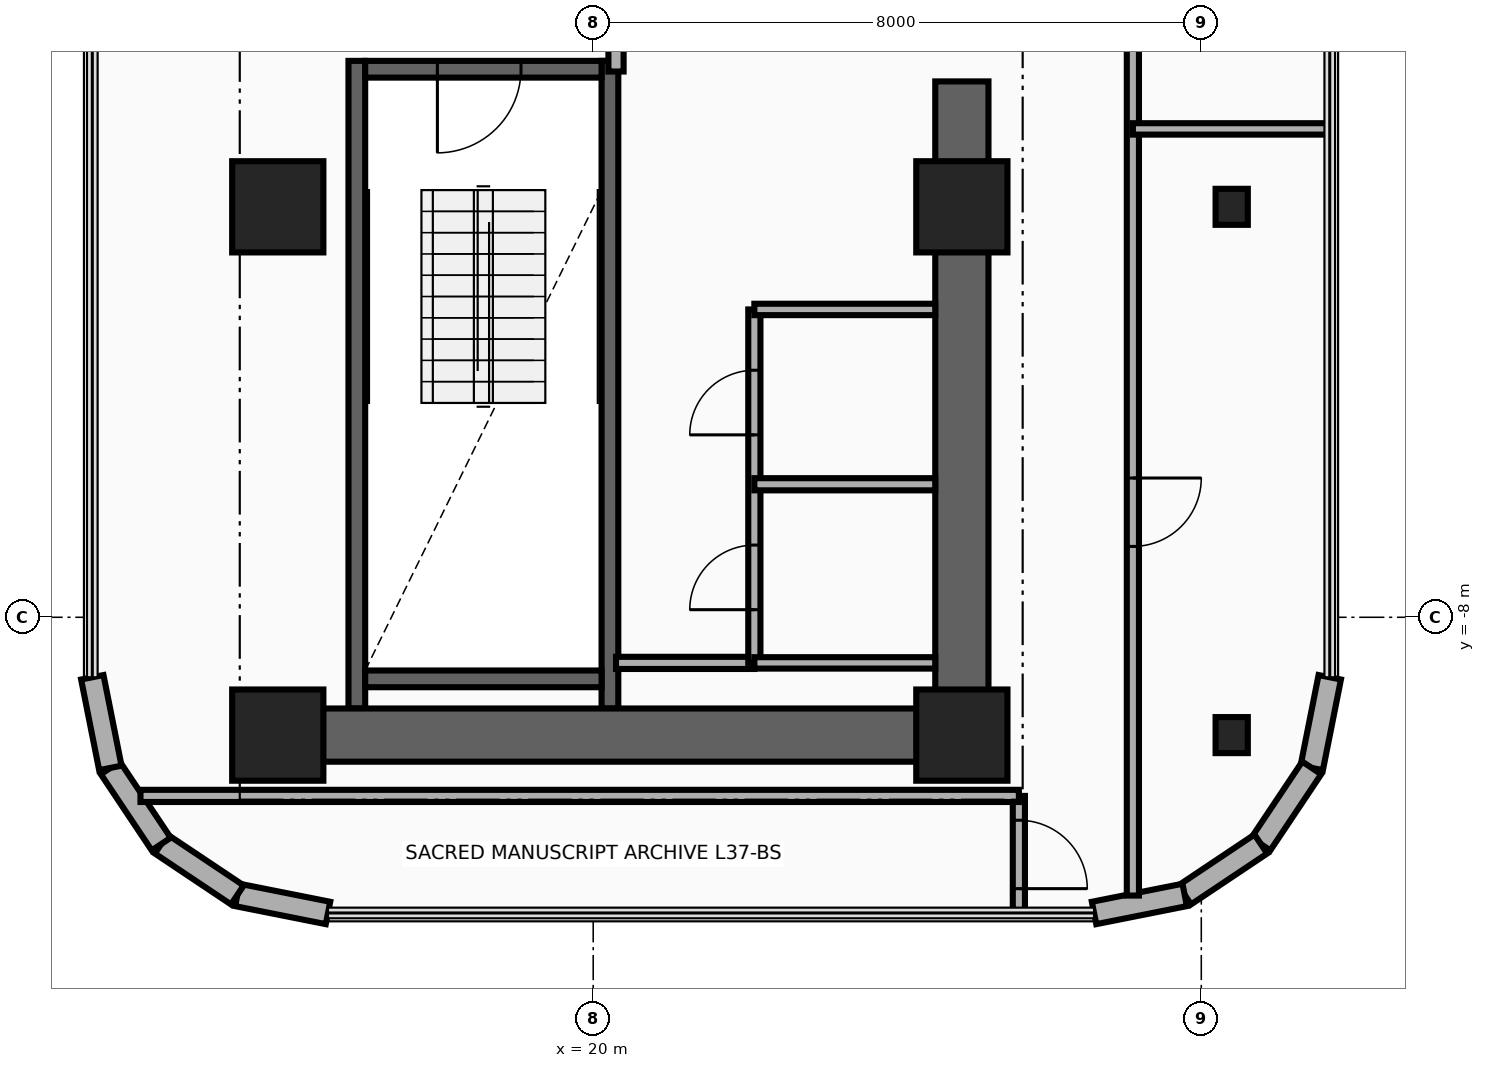
"""IFC4 building model, lengths in metres.
Left out: names, types, materials, properties, quantities, classifications, styles, units other than length and angle.
Written with IfcOpenShell. Run it as: python <this file> out.ifc"""

import sys

from ifc_helpers import new_model, si_unit, direction, frame, frame_2d, origin, origin_2d, place, context, subcontext, project, spatial, rectangle, i_section, extrude, source, transform, mapped, element, fill, save


model = new_model("IFC4")
c1 = context("Model", 3, precision=1e-05, world=origin(), true_north=direction((0.0, 1.0)))
c2 = subcontext(c1, "Body", "Model", "MODEL_VIEW")
j1 = project(units=[si_unit("LENGTHUNIT", "METRE"), si_unit("PLANEANGLEUNIT", "RADIAN")], contexts=[c1])
p1 = place(None, origin())
s1 = spatial("IfcSite", under=j1, at=p1, CompositionType="ELEMENT")
p2 = place(p1, origin())
s2 = spatial("IfcBuilding", under=s1, at=p2, CompositionType="ELEMENT")
p3 = place(p2, frame((0.0, 0.0, 146.4)))
s3 = spatial("IfcBuildingStorey", under=s2, at=p3, CompositionType="ELEMENT", Elevation=146.4)
for number, where, z_axis, x_axis in (
    (1, (16.89, -9.2, 0.0), (0.0, 0.0, 1.0), (0.0, 1.0, 0.0)),
    (2, (20.22, -9.2, 0.0), (0.0, 0.0, 1.0), (0.0, 1.0, 0.0)),
):
    element("IfcWall", number, at=place(p3, frame(where, z_axis=z_axis, x_axis=x_axis)), inside=s3, PredefinedType="SHEAR", context=c2, shape_type="SweptSolid", body=[
        extrude(rectangle(XDim=8.52, YDim=0.22, at=frame_2d((4.26, 0.0))), origin(), (0.0, 0.0, 1.0), 3.46),
    ])
p4 = place(p3, frame((17.0, -8.81, 0.0), z_axis=(0.0, 0.0, 1.0), x_axis=(1.0, 0.0, 0.0)))
e3 = element("IfcWall", 3, at=p4, inside=s3, PredefinedType="SHEAR", context=c2, shape_type="SweptSolid", body=[
    extrude(rectangle(XDim=3.11, YDim=0.22, at=frame_2d((1.555, 0.0))), origin(), (0.0, 0.0, 1.0), 3.46),
])
p5 = place(p3, frame((17.0, -0.79, 0.0), z_axis=(0.0, 0.0, 1.0), x_axis=(1.0, 0.0, 0.0)))
e4 = element("IfcWall", 4, at=p5, inside=s3, PredefinedType="SHEAR", context=c2, shape_type="SweptSolid", body=[
    extrude(rectangle(XDim=3.11, YDim=0.22, at=frame_2d((1.555, 0.0))), origin(), (0.0, 0.0, 1.0), 3.46),
])
p6 = place(p5, frame((0.95, 0.0, 0.0)))
e5 = element("IfcOpeningElement", 5, at=p6, cuts=e4, PredefinedType="OPENING", context=c2, shape_type="SweptSolid", body=[
    extrude(rectangle(XDim=1.1, YDim=2.15, at=frame_2d((0.55, 1.075))), frame((0.0, 0.125, 0.0), z_axis=(0.0, -1.0, 0.0), x_axis=(1.0, 0.0, 0.0)), (0.0, 0.0, 1.0), 0.25),
])
p7 = place(p3, frame((24.85, -9.9, 0.0), z_axis=(0.0, 0.0, 1.0), x_axis=(0.0, 1.0, 0.0)))
e6 = element("IfcWall", 6, at=p7, inside=s3, PredefinedType="SHEAR", context=c2, shape_type="SweptSolid", body=[
    extrude(rectangle(XDim=8.95, YDim=0.7, at=frame_2d((4.475, 0.0))), origin(), (0.0, 0.0, 1.0), 3.46),
])
p8 = place(p3, frame((15.85, -9.55, 0.0), z_axis=(0.0, 0.0, 1.0), x_axis=(1.0, 0.0, 0.0)))
e7 = element("IfcWall", 7, at=p8, inside=s3, PredefinedType="SHEAR", context=c2, shape_type="SweptSolid", body=[
    extrude(rectangle(XDim=9.0, YDim=0.7, at=frame_2d((4.5, 0.0))), origin(), (0.0, 0.0, 1.0), 3.46),
])
m1 = source(origin(), c2, "Body", "SweptSolid", [
    extrude(rectangle(XDim=1.2, YDim=1.2, at=origin_2d()), origin(), (0.0, 0.0, 1.0), 3.7),
])
for number, where, z_axis, x_axis in (
    (8, (15.85, -9.55, 0.0), (0.0, 0.0, 1.0), (1.0, 0.0, 0.0)),
    (9, (24.85, -9.55, 0.0), (0.0, 0.0, 1.0), (1.0, 0.0, 0.0)),
):
    element("IfcColumn", number, at=place(p3, frame(where, z_axis=z_axis, x_axis=x_axis)), inside=s3, PredefinedType="COLUMN", context=c2, shape_type="MappedRepresentation", body=[
        mapped(m1, transform((0.0, 0.0, 0.0), x_axis=(1.0, 0.0, 0.0), y_axis=(0.0, 1.0, 0.0), z_axis=(0.0, 0.0, 1.0), scale=1.0)),
    ])
m2 = source(origin(), c2, "Body", "SweptSolid", [
    extrude(i_section(OverallWidth=0.424, OverallDepth=0.474, WebThickness=0.048, FlangeThickness=0.077, at=origin_2d()), origin(), (0.0, 0.0, 1.0), 3.7),
])
p9 = place(p3, frame((28.4, -9.55, 0.0), z_axis=(0.0, 0.0, 1.0), x_axis=(1.0, 0.0, 0.0)))
e10 = element("IfcColumn", 10, at=p9, inside=s3, PredefinedType="COLUMN", context=c2, shape_type="MappedRepresentation", body=[
    mapped(m2, transform((0.0, 0.0, 0.0), x_axis=(1.0, 0.0, 0.0), y_axis=(0.0, 1.0, 0.0), z_axis=(0.0, 0.0, 1.0), scale=1.0)),
])
for number, where, z_axis, x_axis in (
    (11, (15.85, -2.6, 0.0), (0.0, 0.0, 1.0), (1.0, 0.0, 0.0)),
    (12, (24.85, -2.6, 0.0), (0.0, 0.0, 1.0), (1.0, 0.0, 0.0)),
):
    element("IfcColumn", number, at=place(p3, frame(where, z_axis=z_axis, x_axis=x_axis)), inside=s3, PredefinedType="COLUMN", context=c2, shape_type="MappedRepresentation", body=[
        mapped(m1, transform((0.0, 0.0, 0.0), x_axis=(1.0, 0.0, 0.0), y_axis=(0.0, 1.0, 0.0), z_axis=(0.0, 0.0, 1.0), scale=1.0)),
    ])
p10 = place(p3, frame((28.4, -2.6, 0.0), z_axis=(0.0, 0.0, 1.0), x_axis=(1.0, 0.0, 0.0)))
e13 = element("IfcColumn", 13, at=p10, inside=s3, PredefinedType="COLUMN", context=c2, shape_type="MappedRepresentation", body=[
    mapped(m2, transform((0.0, 0.0, 0.0), x_axis=(1.0, 0.0, 0.0), y_axis=(0.0, 1.0, 0.0), z_axis=(0.0, 0.0, 1.0), scale=1.0)),
])
p11 = place(p3, frame((29.69, -8.789, 0.0), z_axis=(0.0, 0.0, 1.0), x_axis=(-0.194996050505, -0.980804027463, 0.0)))
e14 = element("IfcWall", 14, at=p11, inside=s3, PredefinedType="SOLIDWALL", context=c2, shape_type="SweptSolid", body=[
    extrude(rectangle(XDim=1.216, YDim=0.3, at=frame_2d((0.608, 0.0))), origin(), (0.0, 0.0, 1.0), 3.46),
])
for number, where, z_axis, x_axis in (
    (15, (29.453, -9.982, 0.0), (0.0, 0.0, 1.0), (-0.556, -0.831, 0.0)),
    (16, (28.783, -10.983, 0.0), (0.0, 0.0, 1.0), (-0.831, -0.556, 0.0)),
):
    element("IfcWall", number, at=place(p3, frame(where, z_axis=z_axis, x_axis=x_axis)), inside=s3, PredefinedType="SOLIDWALL", context=c2, shape_type="SweptSolid", body=[
        extrude(rectangle(XDim=1.205, YDim=0.3, at=frame_2d((0.603, 0.0))), origin(), (0.0, 0.0, 1.0), 3.46),
    ])
p12 = place(p3, frame((27.782, -11.653, 0.0), z_axis=(0.0, 0.0, 1.0), x_axis=(-0.980811661072, -0.194957650543, 0.0)))
e17 = element("IfcWall", 17, at=p12, inside=s3, PredefinedType="SOLIDWALL", context=c2, shape_type="SweptSolid", body=[
    extrude(rectangle(XDim=1.216, YDim=0.3, at=frame_2d((0.608, 0.0))), origin(), (0.0, 0.0, 1.0), 3.46),
])
p13 = place(p3, frame((16.511, -11.89, 0.0), z_axis=(0.0, 0.0, 1.0), x_axis=(-0.980804027463, 0.194996050505, 0.0)))
e18 = element("IfcWall", 18, at=p13, inside=s3, PredefinedType="SOLIDWALL", context=c2, shape_type="SweptSolid", body=[
    extrude(rectangle(XDim=1.216, YDim=0.3, at=frame_2d((0.608, 0.0))), origin(), (0.0, 0.0, 1.0), 3.46),
])
for number, where, z_axis, x_axis in (
    (19, (15.318, -11.653, 0.0), (0.0, 0.0, 1.0), (-0.831, 0.556, 0.0)),
    (20, (14.317, -10.983, 0.0), (0.0, 0.0, 1.0), (-0.556, 0.831, 0.0)),
):
    element("IfcWall", number, at=place(p3, frame(where, z_axis=z_axis, x_axis=x_axis)), inside=s3, PredefinedType="SOLIDWALL", context=c2, shape_type="SweptSolid", body=[
        extrude(rectangle(XDim=1.205, YDim=0.3, at=frame_2d((0.603, 0.0))), origin(), (0.0, 0.0, 1.0), 3.46),
    ])
p14 = place(p3, frame((13.647, -9.982, 0.0), z_axis=(0.0, 0.0, 1.0), x_axis=(-0.195189223115, 0.980765602568, 0.0)))
e21 = element("IfcWall", 21, at=p14, inside=s3, PredefinedType="SOLIDWALL", context=c2, shape_type="SweptSolid", body=[
    extrude(rectangle(XDim=1.216, YDim=0.3, at=frame_2d((0.608, 0.0))), origin(), (0.0, 0.0, 1.0), 3.46),
])
p15 = place(p3, frame((20.3, -0.82, 0.0), z_axis=(0.0, 0.0, 1.0), x_axis=(0.0, 1.0, 0.0)))
e22 = element("IfcWall", 22, at=p15, inside=s3, PredefinedType="PARTITIONING", context=c2, shape_type="SweptSolid", body=[
    extrude(rectangle(XDim=1.64, YDim=0.2, at=frame_2d((0.82, 0.0))), origin(), (0.0, 0.0, 1.0), 3.46),
])
p16 = place(p15, frame((0.295, 0.0, 0.0)))
e23 = element("IfcOpeningElement", 23, at=p16, cuts=e22, PredefinedType="OPENING", context=c2, shape_type="SweptSolid", body=[
    extrude(rectangle(XDim=1.05, YDim=2.15, at=frame_2d((0.525, 1.075))), frame((0.0, 0.115, 0.0), z_axis=(0.0, -1.0, 0.0), x_axis=(1.0, 0.0, 0.0)), (0.0, 0.0, 1.0), 0.23),
])
p17 = place(p3, frame((20.3, -8.6, 0.0), z_axis=(0.0, 0.0, 1.0), x_axis=(1.0, 0.0, 0.0)))
e24 = element("IfcWall", 24, at=p17, inside=s3, PredefinedType="PARTITIONING", context=c2, shape_type="SweptSolid", body=[
    extrude(rectangle(XDim=1.82, YDim=0.16, at=frame_2d((0.91, 0.0))), origin(), (0.0, 0.0, 1.0), 3.46),
])
p18 = place(p3, frame((22.12, -8.6, 0.0), z_axis=(0.0, 0.0, 1.0), x_axis=(0.0, 1.0, 0.0)))
e25 = element("IfcWall", 25, at=p18, inside=s3, PredefinedType="PARTITIONING", context=c2, shape_type="SweptSolid", body=[
    extrude(rectangle(XDim=4.65, YDim=0.16, at=frame_2d((2.325, 0.0))), origin(), (0.0, 0.0, 1.0), 3.46),
])
p19 = place(p18, frame((0.7, 0.0, 0.0)))
e26 = element("IfcOpeningElement", 26, at=p19, cuts=e25, PredefinedType="OPENING", context=c2, shape_type="SweptSolid", body=[
    extrude(rectangle(XDim=0.85, YDim=2.05, at=frame_2d((0.425, 1.025))), frame((0.0, 0.095, 0.0), z_axis=(0.0, -1.0, 0.0), x_axis=(1.0, 0.0, 0.0)), (0.0, 0.0, 1.0), 0.19),
])
p20 = place(p18, frame((3.0, 0.0, 0.0)))
e27 = element("IfcOpeningElement", 27, at=p20, cuts=e25, PredefinedType="OPENING", context=c2, shape_type="SweptSolid", body=[
    extrude(rectangle(XDim=0.85, YDim=2.05, at=frame_2d((0.425, 1.025))), frame((0.0, 0.095, 0.0), z_axis=(0.0, -1.0, 0.0), x_axis=(1.0, 0.0, 0.0)), (0.0, 0.0, 1.0), 0.19),
])
for number, where, z_axis, x_axis in (
    (28, (22.12, -3.95, 0.0), (0.0, 0.0, 1.0), (1.0, 0.0, 0.0)),
    (29, (22.12, -8.6, 0.0), (0.0, 0.0, 1.0), (1.0, 0.0, 0.0)),
):
    element("IfcWall", number, at=place(p3, frame(where, z_axis=z_axis, x_axis=x_axis)), inside=s3, PredefinedType="PARTITIONING", context=c2, shape_type="SweptSolid", body=[
        extrude(rectangle(XDim=2.38, YDim=0.15, at=frame_2d((1.19, 0.0))), origin(), (0.0, 0.0, 1.0), 3.46),
    ])
p21 = place(p3, frame((22.12, -6.25, 0.0), z_axis=(0.0, 0.0, 1.0), x_axis=(1.0, 0.0, 0.0)))
e30 = element("IfcWall", 30, at=p21, inside=s3, PredefinedType="PARTITIONING", context=c2, shape_type="SweptSolid", body=[
    extrude(rectangle(XDim=2.38, YDim=0.16, at=frame_2d((1.19, 0.0))), origin(), (0.0, 0.0, 1.0), 3.46),
])
p22 = place(p3, frame((25.6, -11.89, 0.0), z_axis=(0.0, 0.0, 1.0), x_axis=(0.0, 1.0, 0.0)))
e31 = element("IfcWall", 31, at=p22, inside=s3, PredefinedType="PARTITIONING", context=c2, shape_type="SweptSolid", body=[
    extrude(rectangle(XDim=1.54, YDim=0.16, at=frame_2d((0.77, 0.0))), origin(), (0.0, 0.0, 1.0), 3.46),
])
p23 = place(p22, frame((0.32, 0.0, 0.0)))
e32 = element("IfcOpeningElement", 32, at=p23, cuts=e31, PredefinedType="OPENING", context=c2, shape_type="SweptSolid", body=[
    extrude(rectangle(XDim=0.9, YDim=2.1, at=frame_2d((0.45, 1.05))), frame((0.0, 0.095, 0.0), z_axis=(0.0, -1.0, 0.0), x_axis=(1.0, 0.0, 0.0)), (0.0, 0.0, 1.0), 0.19),
])
p24 = place(p3, frame((14.044, -10.35, 0.0), z_axis=(0.0, 0.0, 1.0), x_axis=(1.0, 0.0, 0.0)))
e33 = element("IfcWall", 33, at=p24, inside=s3, PredefinedType="PARTITIONING", context=c2, shape_type="SweptSolid", body=[
    extrude(rectangle(XDim=11.556, YDim=0.16, at=frame_2d((5.778, 0.0))), origin(), (0.0, 0.0, 1.0), 3.46),
])
p25 = place(p3, frame((27.1, -11.661, 0.0), z_axis=(0.0, 0.0, 1.0), x_axis=(0.0, 1.0, 0.0)))
e34 = element("IfcWall", 34, at=p25, inside=s3, PredefinedType="PARTITIONING", context=c2, shape_type="SweptSolid", body=[
    extrude(rectangle(XDim=23.511, YDim=0.16, at=frame_2d((11.755, 0.0))), origin(), (0.0, 0.0, 1.0), 2.666),
])
p26 = place(p25, frame((4.593, 0.0, 0.0)))
e35 = element("IfcOpeningElement", 35, at=p26, cuts=e34, PredefinedType="OPENING", context=c2, shape_type="SweptSolid", body=[
    extrude(rectangle(XDim=0.9, YDim=2.1, at=frame_2d((0.45, 1.05))), frame((0.0, 0.095, 0.0), z_axis=(0.0, -1.0, 0.0), x_axis=(1.0, 0.0, 0.0)), (0.0, 0.0, 1.0), 0.19),
])
p27 = place(p25, frame((16.348, 0.0, 0.0)))
e36 = element("IfcOpeningElement", 36, at=p27, cuts=e34, PredefinedType="OPENING", context=c2, shape_type="SweptSolid", body=[
    extrude(rectangle(XDim=0.9, YDim=2.1, at=frame_2d((0.45, 1.05))), frame((0.0, 0.095, 0.0), z_axis=(0.0, -1.0, 0.0), x_axis=(1.0, 0.0, 0.0)), (0.0, 0.0, 1.0), 0.19),
])
p28 = place(p3, frame((27.1, -1.575, 0.0), z_axis=(0.0, 0.0, 1.0), x_axis=(1.0, 0.0, 0.0)))
e37 = element("IfcWall", 37, at=p28, inside=s3, PredefinedType="PARTITIONING", context=c2, shape_type="SweptSolid", body=[
    extrude(rectangle(XDim=2.59, YDim=0.15, at=frame_2d((1.295, 0.0))), origin(), (0.0, 0.0, 1.0), 2.896),
])
p29 = place(p6, frame((1.1, 0.0, 0.0), z_axis=(0.0, 0.0, 1.0), x_axis=(-1.0, 0.0, 0.0)))
e38 = element("IfcDoor", 38, at=p29, inside=s3, OperationType="SINGLE_SWING_LEFT", PredefinedType="DOOR", context=c2, shape_type="SweptSolid", body=[
    extrude(rectangle(XDim=1.1, YDim=2.15, at=frame_2d((0.55, 1.075))), frame((0.0, 0.025, 0.0), z_axis=(0.0, -1.0, 0.0), x_axis=(1.0, 0.0, 0.0)), (0.0, 0.0, 1.0), 0.05),
])
fill(e5, e38)
p30 = place(p19, origin())
e39 = element("IfcDoor", 39, at=p30, inside=s3, OperationType="SINGLE_SWING_LEFT", PredefinedType="DOOR", context=c2, shape_type="SweptSolid", body=[
    extrude(rectangle(XDim=0.85, YDim=2.05, at=frame_2d((0.425, 1.025))), frame((0.0, 0.025, 0.0), z_axis=(0.0, -1.0, 0.0), x_axis=(1.0, 0.0, 0.0)), (0.0, 0.0, 1.0), 0.05),
])
fill(e26, e39)
p31 = place(p20, origin())
e40 = element("IfcDoor", 40, at=p31, inside=s3, OperationType="SINGLE_SWING_RIGHT", PredefinedType="DOOR", context=c2, shape_type="SweptSolid", body=[
    extrude(rectangle(XDim=0.85, YDim=2.05, at=frame_2d((0.425, 1.025))), frame((0.0, 0.025, 0.0), z_axis=(0.0, -1.0, 0.0), x_axis=(1.0, 0.0, 0.0)), (0.0, 0.0, 1.0), 0.05),
])
fill(e27, e40)
p32 = place(p23, frame((0.9, 0.0, 0.0), z_axis=(0.0, 0.0, 1.0), x_axis=(-1.0, 0.0, 0.0)))
e41 = element("IfcDoor", 41, at=p32, inside=s3, OperationType="SINGLE_SWING_LEFT", PredefinedType="DOOR", context=c2, shape_type="SweptSolid", body=[
    extrude(rectangle(XDim=0.9, YDim=2.1, at=frame_2d((0.45, 1.05))), frame((0.0, 0.025, 0.0), z_axis=(0.0, -1.0, 0.0), x_axis=(1.0, 0.0, 0.0)), (0.0, 0.0, 1.0), 0.05),
])
fill(e32, e41)
p33 = place(p26, frame((0.9, 0.0, 0.0), z_axis=(0.0, 0.0, 1.0), x_axis=(-1.0, 0.0, 0.0)))
e42 = element("IfcDoor", 42, at=p33, inside=s3, OperationType="SINGLE_SWING_LEFT", PredefinedType="DOOR", context=c2, shape_type="SweptSolid", body=[
    extrude(rectangle(XDim=0.9, YDim=2.1, at=frame_2d((0.45, 1.05))), frame((0.0, 0.025, 0.0), z_axis=(0.0, -1.0, 0.0), x_axis=(1.0, 0.0, 0.0)), (0.0, 0.0, 1.0), 0.05),
])
fill(e35, e42)
save(model, sys.argv[1])
